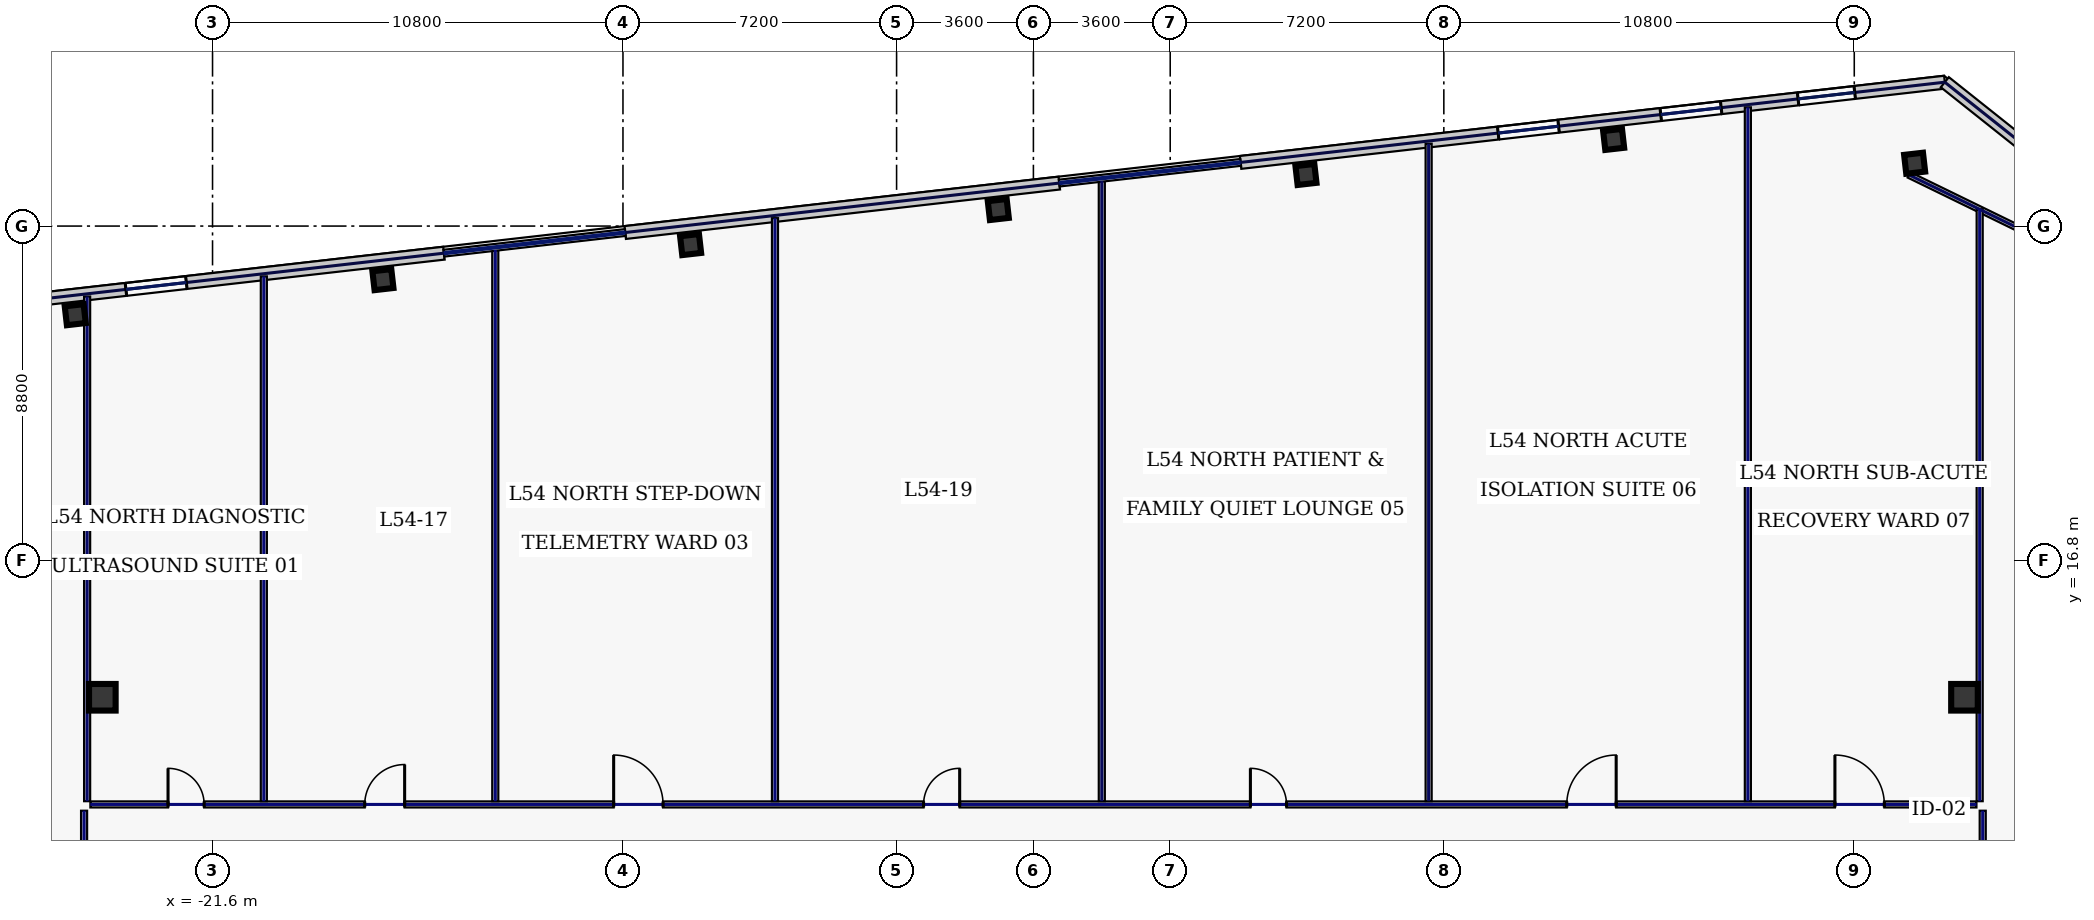
"""IFC4 building model, lengths in metres.
Left out: names, types, materials, properties, quantities, classifications, styles, units other than length and angle.
Written with IfcOpenShell. Run it as: python <this file> out.ifc"""

import sys

from ifc_helpers import new_model, si_unit, direction, frame, frame_2d, origin, origin_2d, place, context, subcontext, project, spatial, rectangle, hollow_rectangle, extrude, element, fill, save


model = new_model("IFC4")
c1 = context("Model", 3, precision=1e-05, world=origin(), true_north=direction((0.0, 1.0)))
c2 = subcontext(c1, "Body", "Model", "MODEL_VIEW")
j1 = project(units=[si_unit("LENGTHUNIT", "METRE"), si_unit("PLANEANGLEUNIT", "RADIAN")], contexts=[c1])
p1 = place(None, origin())
s1 = spatial("IfcSite", under=j1, at=p1, CompositionType="ELEMENT")
p2 = place(p1, origin())
s2 = spatial("IfcBuilding", under=s1, at=p2, CompositionType="ELEMENT")
p3 = place(p2, frame((0.0, 0.0, 234.2)))
s3 = spatial("IfcBuildingStorey", under=s2, at=p3, CompositionType="ELEMENT", Elevation=234.2)
for number, where, z_axis, x_axis in (
    (1, (-24.5, 13.2, 0.0), (0.0, 0.0, 1.0), (1.0, 0.0, 0.0)),
    (2, (24.5, 13.2, 0.0), (0.0, 0.0, 1.0), (1.0, 0.0, 0.0)),
):
    element("IfcColumn", number, at=place(p3, frame(where, z_axis=z_axis, x_axis=x_axis)), inside=s3, PredefinedType="COLUMN", context=c2, shape_type="SweptSolid", body=[
        extrude(hollow_rectangle(XDim=0.7, YDim=0.7, WallThickness=0.032, at=origin_2d()), origin(), (0.0, 0.0, 1.0), 3.74),
    ])
for number, where, z_axis, x_axis in (
    (3, (23.188, 27.253, 0.0), (0.0, 0.0, 1.0), (0.994, 0.113, 0.0)),
    (4, (15.269, 27.88, 0.0), (0.0, 0.0, 1.0), (0.994, 0.113, 0.0)),
    (5, (7.172, 26.958, 0.0), (0.0, 0.0, 1.0), (0.994, 0.113, 0.0)),
    (6, (-0.924, 26.035, 0.0), (0.0, 0.0, 1.0), (0.994, 0.113, 0.0)),
    (7, (-9.02, 25.113, 0.0), (0.0, 0.0, 1.0), (0.994, 0.113, 0.0)),
    (8, (-17.116, 24.19, 0.0), (0.0, 0.0, 1.0), (0.994, 0.113, 0.0)),
    (9, (-25.212, 23.268, 0.0), (0.0, 0.0, 1.0), (0.994, 0.113, 0.0)),
):
    element("IfcColumn", number, at=place(p3, frame(where, z_axis=z_axis, x_axis=x_axis)), inside=s3, PredefinedType="COLUMN", context=c2, shape_type="SweptSolid", body=[
        extrude(hollow_rectangle(XDim=0.5, YDim=0.5, WallThickness=0.025, at=origin_2d()), origin(), (0.0, 0.0, 1.0), 3.74),
    ])
p4 = place(p3, frame((23.983, 29.386, 0.0), z_axis=(0.0, 0.0, 1.0), x_axis=(-0.993572271362, -0.113199565282, 0.0)))
e10 = element("IfcWall", 10, at=p4, inside=s3, PredefinedType="STANDARD", context=c2, shape_type="SweptSolid", body=[
    extrude(rectangle(XDim=18.651, YDim=0.34, at=frame_2d((9.326, 0.0))), origin(), (0.0, 0.0, 1.0), 3.74),
])
p5 = place(p4, frame((10.229, 0.0, 0.22)))
e11 = element("IfcOpeningElement", 11, at=p5, cuts=e10, PredefinedType="OPENING", context=c2, shape_type="SweptSolid", body=[
    extrude(rectangle(XDim=1.6, YDim=1.2, at=frame_2d((0.8, 0.6))), frame((0.0, 0.18, 0.0), z_axis=(0.0, -1.0, 0.0), x_axis=(1.0, 0.0, 0.0)), (0.0, 0.0, 1.0), 0.36),
])
p6 = place(p4, frame((5.923, 0.0, 0.22)))
e12 = element("IfcOpeningElement", 12, at=p6, cuts=e10, PredefinedType="OPENING", context=c2, shape_type="SweptSolid", body=[
    extrude(rectangle(XDim=1.6, YDim=1.2, at=frame_2d((0.8, 0.6))), frame((0.0, 0.18, 0.0), z_axis=(0.0, -1.0, 0.0), x_axis=(1.0, 0.0, 0.0)), (0.0, 0.0, 1.0), 0.36),
])
p7 = place(p4, frame((2.386, 0.0, 0.83)))
e13 = element("IfcOpeningElement", 13, at=p7, cuts=e10, PredefinedType="OPENING", context=c2, shape_type="SweptSolid", body=[
    extrude(rectangle(XDim=1.5, YDim=2.0, at=frame_2d((0.75, 1.0))), frame((0.0, 0.18, 0.0), z_axis=(0.0, -1.0, 0.0), x_axis=(1.0, 0.0, 0.0)), (0.0, 0.0, 1.0), 0.36),
])
p8 = place(p3, frame((0.682, 26.731, 0.0), z_axis=(0.0, 0.0, 1.0), x_axis=(-0.993571968199, -0.113202226169, 0.0)))
e14 = element("IfcWall", 14, at=p8, inside=s3, PredefinedType="STANDARD", context=c2, shape_type="SweptSolid", body=[
    extrude(rectangle(XDim=11.497, YDim=0.34, at=frame_2d((5.749, 0.0))), origin(), (0.0, 0.0, 1.0), 3.74),
])
p9 = place(p3, frame((-15.51, 24.886, 0.0), z_axis=(0.0, 0.0, 1.0), x_axis=(-0.993572271362, -0.113199565282, 0.0)))
e15 = element("IfcWall", 15, at=p9, inside=s3, PredefinedType="STANDARD", context=c2, shape_type="SweptSolid", body=[
    extrude(rectangle(XDim=18.651, YDim=0.34, at=frame_2d((9.326, 0.0))), origin(), (0.0, 0.0, 1.0), 3.74),
])
p10 = place(p9, frame((14.971, 0.0, 0.22)))
e16 = element("IfcOpeningElement", 16, at=p10, cuts=e15, PredefinedType="OPENING", context=c2, shape_type="SweptSolid", body=[
    extrude(rectangle(XDim=1.6, YDim=1.2, at=frame_2d((0.8, 0.6))), frame((0.0, 0.18, 0.0), z_axis=(0.0, -1.0, 0.0), x_axis=(1.0, 0.0, 0.0)), (0.0, 0.0, 1.0), 0.36),
])
p11 = place(p9, frame((11.223, 0.0, 0.22)))
e17 = element("IfcOpeningElement", 17, at=p11, cuts=e15, PredefinedType="OPENING", context=c2, shape_type="SweptSolid", body=[
    extrude(rectangle(XDim=1.6, YDim=1.2, at=frame_2d((0.8, 0.6))), frame((0.0, 0.18, 0.0), z_axis=(0.0, -1.0, 0.0), x_axis=(1.0, 0.0, 0.0)), (0.0, 0.0, 1.0), 0.36),
])
p12 = place(p9, frame((6.823, 0.0, 0.22)))
e18 = element("IfcOpeningElement", 18, at=p12, cuts=e15, PredefinedType="OPENING", context=c2, shape_type="SweptSolid", body=[
    extrude(rectangle(XDim=1.6, YDim=1.2, at=frame_2d((0.8, 0.6))), frame((0.0, 0.18, 0.0), z_axis=(0.0, -1.0, 0.0), x_axis=(1.0, 0.0, 0.0)), (0.0, 0.0, 1.0), 0.36),
])
p13 = place(p3, frame((29.107, 25.31, 0.0), z_axis=(0.0, 0.0, 1.0), x_axis=(-0.78259733853, 0.62252823689, 0.0)))
e19 = element("IfcWall", 19, at=p13, inside=s3, PredefinedType="STANDARD", context=c2, shape_type="SweptSolid", body=[
    extrude(rectangle(XDim=6.548, YDim=0.34, at=frame_2d((3.274, 0.0))), origin(), (0.0, 0.0, 1.0), 3.74),
])
p14 = place(p3, frame((28.528, 24.271, 0.0), z_axis=(0.0, 0.0, 1.0), x_axis=(-0.898820692789, 0.438316509173, 0.0)))
e20 = element("IfcWall", 20, at=p14, inside=s3, PredefinedType="PARTITIONING", context=c2, shape_type="SweptSolid", body=[
    extrude(rectangle(XDim=6.107, YDim=0.16, at=frame_2d((3.053, 0.0))), origin(), (0.0, 0.0, 1.0), 1.535),
])
p15 = place(p3, frame((-24.98, 7.235, 0.0), z_axis=(0.0, 0.0, 1.0), x_axis=(0.0, 1.0, 0.0)))
e21 = element("IfcWall", 21, at=p15, inside=s3, PredefinedType="PARTITIONING", context=c2, shape_type="SweptSolid", body=[
    extrude(rectangle(XDim=2.98, YDim=0.16, at=frame_2d((1.49, 0.0))), origin(), (0.0, 0.0, 1.0), 3.74),
])
p16 = place(p15, frame((1.1, 0.0, 0.0)))
e22 = element("IfcOpeningElement", 22, at=p16, cuts=e21, PredefinedType="OPENING", context=c2, shape_type="SweptSolid", body=[
    extrude(rectangle(XDim=0.95, YDim=2.2, at=frame_2d((0.475, 1.1))), frame((0.0, 0.09, 0.0), z_axis=(0.0, -1.0, 0.0), x_axis=(1.0, 0.0, 0.0)), (0.0, 0.0, 1.0), 0.18),
])
p17 = place(p3, frame((-24.815, 10.38, 0.0), z_axis=(0.0, 0.0, 1.0), x_axis=(1.0, 0.0, 0.0)))
e23 = element("IfcWall", 23, at=p17, inside=s3, PredefinedType="PARTITIONING", context=c2, shape_type="SweptSolid", body=[
    extrude(rectangle(XDim=49.63, YDim=0.16, at=frame_2d((24.815, 0.0))), origin(), (0.0, 0.0, 1.0), 3.74),
])
p18 = place(p17, frame((2.044, 0.0, 0.0)))
e24 = element("IfcOpeningElement", 24, at=p18, cuts=e23, PredefinedType="OPENING", context=c2, shape_type="SweptSolid", body=[
    extrude(rectangle(XDim=0.95, YDim=2.2, at=frame_2d((0.475, 1.1))), frame((0.0, 0.09, 0.0), z_axis=(0.0, -1.0, 0.0), x_axis=(1.0, 0.0, 0.0)), (0.0, 0.0, 1.0), 0.18),
])
p19 = place(p17, frame((7.22, 0.0, 0.0)))
e25 = element("IfcOpeningElement", 25, at=p19, cuts=e23, PredefinedType="OPENING", context=c2, shape_type="SweptSolid", body=[
    extrude(rectangle(XDim=1.05, YDim=2.2, at=frame_2d((0.525, 1.1))), frame((0.0, 0.09, 0.0), z_axis=(0.0, -1.0, 0.0), x_axis=(1.0, 0.0, 0.0)), (0.0, 0.0, 1.0), 0.18),
])
p20 = place(p17, frame((13.77, 0.0, 0.0)))
e26 = element("IfcOpeningElement", 26, at=p20, cuts=e23, PredefinedType="OPENING", context=c2, shape_type="SweptSolid", body=[
    extrude(rectangle(XDim=1.3, YDim=2.2, at=frame_2d((0.65, 1.1))), frame((0.0, 0.09, 0.0), z_axis=(0.0, -1.0, 0.0), x_axis=(1.0, 0.0, 0.0)), (0.0, 0.0, 1.0), 0.18),
])
p21 = place(p17, frame((21.925, 0.0, 0.0)))
e27 = element("IfcOpeningElement", 27, at=p21, cuts=e23, PredefinedType="OPENING", context=c2, shape_type="SweptSolid", body=[
    extrude(rectangle(XDim=0.95, YDim=2.2, at=frame_2d((0.475, 1.1))), frame((0.0, 0.09, 0.0), z_axis=(0.0, -1.0, 0.0), x_axis=(1.0, 0.0, 0.0)), (0.0, 0.0, 1.0), 0.18),
])
p22 = place(p17, frame((30.525, 0.0, 0.0)))
e28 = element("IfcOpeningElement", 28, at=p22, cuts=e23, PredefinedType="OPENING", context=c2, shape_type="SweptSolid", body=[
    extrude(rectangle(XDim=0.95, YDim=2.2, at=frame_2d((0.475, 1.1))), frame((0.0, 0.09, 0.0), z_axis=(0.0, -1.0, 0.0), x_axis=(1.0, 0.0, 0.0)), (0.0, 0.0, 1.0), 0.18),
])
p23 = place(p17, frame((38.85, 0.0, 0.0)))
e29 = element("IfcOpeningElement", 29, at=p23, cuts=e23, PredefinedType="OPENING", context=c2, shape_type="SweptSolid", body=[
    extrude(rectangle(XDim=1.3, YDim=2.2, at=frame_2d((0.65, 1.1))), frame((0.0, 0.09, 0.0), z_axis=(0.0, -1.0, 0.0), x_axis=(1.0, 0.0, 0.0)), (0.0, 0.0, 1.0), 0.18),
])
p24 = place(p17, frame((45.906, 0.0, 0.0)))
e30 = element("IfcOpeningElement", 30, at=p24, cuts=e23, PredefinedType="OPENING", context=c2, shape_type="SweptSolid", body=[
    extrude(rectangle(XDim=1.3, YDim=2.2, at=frame_2d((0.65, 1.1))), frame((0.0, 0.09, 0.0), z_axis=(0.0, -1.0, 0.0), x_axis=(1.0, 0.0, 0.0)), (0.0, 0.0, 1.0), 0.18),
])
p25 = place(p3, frame((24.98, 10.215, 0.0), z_axis=(0.0, 0.0, 1.0), x_axis=(0.0, -1.0, 0.0)))
e31 = element("IfcWall", 31, at=p25, inside=s3, PredefinedType="PARTITIONING", context=c2, shape_type="SweptSolid", body=[
    extrude(rectangle(XDim=2.98, YDim=0.16, at=frame_2d((1.49, 0.0))), origin(), (0.0, 0.0, 1.0), 3.74),
])
p26 = place(p25, frame((1.1, 0.0, 0.0)))
e32 = element("IfcOpeningElement", 32, at=p26, cuts=e31, PredefinedType="OPENING", context=c2, shape_type="SweptSolid", body=[
    extrude(rectangle(XDim=0.95, YDim=2.2, at=frame_2d((0.475, 1.1))), frame((0.0, 0.09, 0.0), z_axis=(0.0, -1.0, 0.0), x_axis=(1.0, 0.0, 0.0)), (0.0, 0.0, 1.0), 0.18),
])
p27 = place(p3, frame((-24.9, 10.465, 0.0), z_axis=(0.0, 0.0, 1.0), x_axis=(0.0, 1.0, 0.0)))
e33 = element("IfcWall", 33, at=p27, inside=s3, PredefinedType="PARTITIONING", context=c2, shape_type="SweptSolid", body=[
    extrude(rectangle(XDim=13.281, YDim=0.16, at=frame_2d((6.641, 0.0))), origin(), (0.0, 0.0, 1.0), 3.285),
])
p28 = place(p3, frame((24.9, 10.465, 0.0), z_axis=(0.0, 0.0, 1.0), x_axis=(0.0, 1.0, 0.0)))
e34 = element("IfcWall", 34, at=p28, inside=s3, PredefinedType="PARTITIONING", context=c2, shape_type="SweptSolid", body=[
    extrude(rectangle(XDim=15.579, YDim=0.16, at=frame_2d((7.79, 0.0))), origin(), (0.0, 0.0, 1.0), 3.74),
])
p29 = place(p3, frame((-20.25, 10.465, 0.0), z_axis=(0.0, 0.0, 1.0), x_axis=(0.0, 1.0, 0.0)))
e35 = element("IfcWall", 35, at=p29, inside=s3, PredefinedType="PARTITIONING", context=c2, shape_type="SweptSolid", body=[
    extrude(rectangle(XDim=13.811, YDim=0.16, at=frame_2d((6.906, 0.0))), origin(), (0.0, 0.0, 1.0), 3.74),
])
p30 = place(p3, frame((-14.16, 10.465, 0.0), z_axis=(0.0, 0.0, 1.0), x_axis=(0.0, 1.0, 0.0)))
e36 = element("IfcWall", 36, at=p30, inside=s3, PredefinedType="PARTITIONING", context=c2, shape_type="SweptSolid", body=[
    extrude(rectangle(XDim=14.505, YDim=0.16, at=frame_2d((7.252, 0.0))), origin(), (0.0, 0.0, 1.0), 3.74),
])
p31 = place(p3, frame((-6.8, 10.465, 0.0), z_axis=(0.0, 0.0, 1.0), x_axis=(0.0, 1.0, 0.0)))
e37 = element("IfcWall", 37, at=p31, inside=s3, PredefinedType="PARTITIONING", context=c2, shape_type="SweptSolid", body=[
    extrude(rectangle(XDim=15.344, YDim=0.16, at=frame_2d((7.672, 0.0))), origin(), (0.0, 0.0, 1.0), 3.74),
])
p32 = place(p3, frame((1.8, 10.465, 0.0), z_axis=(0.0, 0.0, 1.0), x_axis=(0.0, 1.0, 0.0)))
e38 = element("IfcWall", 38, at=p32, inside=s3, PredefinedType="PARTITIONING", context=c2, shape_type="SweptSolid", body=[
    extrude(rectangle(XDim=16.323, YDim=0.16, at=frame_2d((8.162, 0.0))), origin(), (0.0, 0.0, 1.0), 1.535),
])
p33 = place(p3, frame((10.4, 10.465, 0.0), z_axis=(0.0, 0.0, 1.0), x_axis=(0.0, 1.0, 0.0)))
e39 = element("IfcWall", 39, at=p33, inside=s3, PredefinedType="PARTITIONING", context=c2, shape_type="SweptSolid", body=[
    extrude(rectangle(XDim=17.303, YDim=0.16, at=frame_2d((8.652, 0.0))), origin(), (0.0, 0.0, 1.0), 1.535),
])
p34 = place(p3, frame((18.8, 10.465, 0.0), z_axis=(0.0, 0.0, 1.0), x_axis=(0.0, 1.0, 0.0)))
e40 = element("IfcWall", 40, at=p34, inside=s3, PredefinedType="PARTITIONING", context=c2, shape_type="SweptSolid", body=[
    extrude(rectangle(XDim=18.26, YDim=0.16, at=frame_2d((9.13, 0.0))), origin(), (0.0, 0.0, 1.0), 3.74),
])
p35 = place(p5, origin())
e41 = element("IfcWindow", 41, at=p35, inside=s3, PartitioningType="SINGLE_PANEL", PredefinedType="WINDOW", context=c2, shape_type="SweptSolid", body=[
    extrude(rectangle(XDim=1.6, YDim=1.2, at=frame_2d((0.8, 0.6))), frame((0.0, 0.03, 0.0), z_axis=(0.0, -1.0, 0.0), x_axis=(1.0, 0.0, 0.0)), (0.0, 0.0, 1.0), 0.06),
])
fill(e11, e41)
p36 = place(p6, origin())
e42 = element("IfcWindow", 42, at=p36, inside=s3, PartitioningType="SINGLE_PANEL", PredefinedType="WINDOW", context=c2, shape_type="SweptSolid", body=[
    extrude(rectangle(XDim=1.6, YDim=1.2, at=frame_2d((0.8, 0.6))), frame((0.0, 0.03, 0.0), z_axis=(0.0, -1.0, 0.0), x_axis=(1.0, 0.0, 0.0)), (0.0, 0.0, 1.0), 0.06),
])
fill(e12, e42)
p37 = place(p7, origin())
e43 = element("IfcWindow", 43, at=p37, inside=s3, PartitioningType="SINGLE_PANEL", PredefinedType="WINDOW", context=c2, shape_type="SweptSolid", body=[
    extrude(rectangle(XDim=1.5, YDim=2.0, at=frame_2d((0.75, 1.0))), frame((0.0, 0.03, 0.0), z_axis=(0.0, -1.0, 0.0), x_axis=(1.0, 0.0, 0.0)), (0.0, 0.0, 1.0), 0.06),
])
fill(e13, e43)
p38 = place(p12, origin())
e44 = element("IfcWindow", 44, at=p38, inside=s3, PartitioningType="SINGLE_PANEL", PredefinedType="WINDOW", context=c2, shape_type="SweptSolid", body=[
    extrude(rectangle(XDim=1.6, YDim=1.2, at=frame_2d((0.8, 0.6))), frame((0.0, 0.03, 0.0), z_axis=(0.0, -1.0, 0.0), x_axis=(1.0, 0.0, 0.0)), (0.0, 0.0, 1.0), 0.06),
])
fill(e18, e44)
p39 = place(p18, origin())
e45 = element("IfcDoor", 45, at=p39, inside=s3, OperationType="SINGLE_SWING_LEFT", PredefinedType="DOOR", context=c2, shape_type="SweptSolid", body=[
    extrude(rectangle(XDim=0.95, YDim=2.2, at=frame_2d((0.475, 1.1))), frame((0.0, 0.025, 0.0), z_axis=(0.0, -1.0, 0.0), x_axis=(1.0, 0.0, 0.0)), (0.0, 0.0, 1.0), 0.05),
])
fill(e24, e45)
p40 = place(p19, origin())
e46 = element("IfcDoor", 46, at=p40, inside=s3, OperationType="SINGLE_SWING_RIGHT", PredefinedType="DOOR", context=c2, shape_type="SweptSolid", body=[
    extrude(rectangle(XDim=1.05, YDim=2.2, at=frame_2d((0.525, 1.1))), frame((0.0, 0.025, 0.0), z_axis=(0.0, -1.0, 0.0), x_axis=(1.0, 0.0, 0.0)), (0.0, 0.0, 1.0), 0.05),
])
fill(e25, e46)
p41 = place(p20, origin())
e47 = element("IfcDoor", 47, at=p41, inside=s3, OperationType="SINGLE_SWING_LEFT", PredefinedType="DOOR", context=c2, shape_type="SweptSolid", body=[
    extrude(rectangle(XDim=1.3, YDim=2.2, at=frame_2d((0.65, 1.1))), frame((0.0, 0.025, 0.0), z_axis=(0.0, -1.0, 0.0), x_axis=(1.0, 0.0, 0.0)), (0.0, 0.0, 1.0), 0.05),
])
fill(e26, e47)
p42 = place(p21, origin())
e48 = element("IfcDoor", 48, at=p42, inside=s3, OperationType="SINGLE_SWING_RIGHT", PredefinedType="DOOR", context=c2, shape_type="SweptSolid", body=[
    extrude(rectangle(XDim=0.95, YDim=2.2, at=frame_2d((0.475, 1.1))), frame((0.0, 0.025, 0.0), z_axis=(0.0, -1.0, 0.0), x_axis=(1.0, 0.0, 0.0)), (0.0, 0.0, 1.0), 0.05),
])
fill(e27, e48)
p43 = place(p22, origin())
e49 = element("IfcDoor", 49, at=p43, inside=s3, OperationType="SINGLE_SWING_LEFT", PredefinedType="DOOR", context=c2, shape_type="SweptSolid", body=[
    extrude(rectangle(XDim=0.95, YDim=2.2, at=frame_2d((0.475, 1.1))), frame((0.0, 0.025, 0.0), z_axis=(0.0, -1.0, 0.0), x_axis=(1.0, 0.0, 0.0)), (0.0, 0.0, 1.0), 0.05),
])
fill(e28, e49)
p44 = place(p23, origin())
e50 = element("IfcDoor", 50, at=p44, inside=s3, OperationType="SINGLE_SWING_RIGHT", PredefinedType="DOOR", context=c2, shape_type="SweptSolid", body=[
    extrude(rectangle(XDim=1.3, YDim=2.2, at=frame_2d((0.65, 1.1))), frame((0.0, 0.025, 0.0), z_axis=(0.0, -1.0, 0.0), x_axis=(1.0, 0.0, 0.0)), (0.0, 0.0, 1.0), 0.05),
])
fill(e29, e50)
p45 = place(p24, origin())
e51 = element("IfcDoor", 51, at=p45, inside=s3, OperationType="SINGLE_SWING_LEFT", PredefinedType="DOOR", context=c2, shape_type="SweptSolid", body=[
    extrude(rectangle(XDim=1.3, YDim=2.2, at=frame_2d((0.65, 1.1))), frame((0.0, 0.025, 0.0), z_axis=(0.0, -1.0, 0.0), x_axis=(1.0, 0.0, 0.0)), (0.0, 0.0, 1.0), 0.05),
])
fill(e30, e51)
save(model, sys.argv[1])
